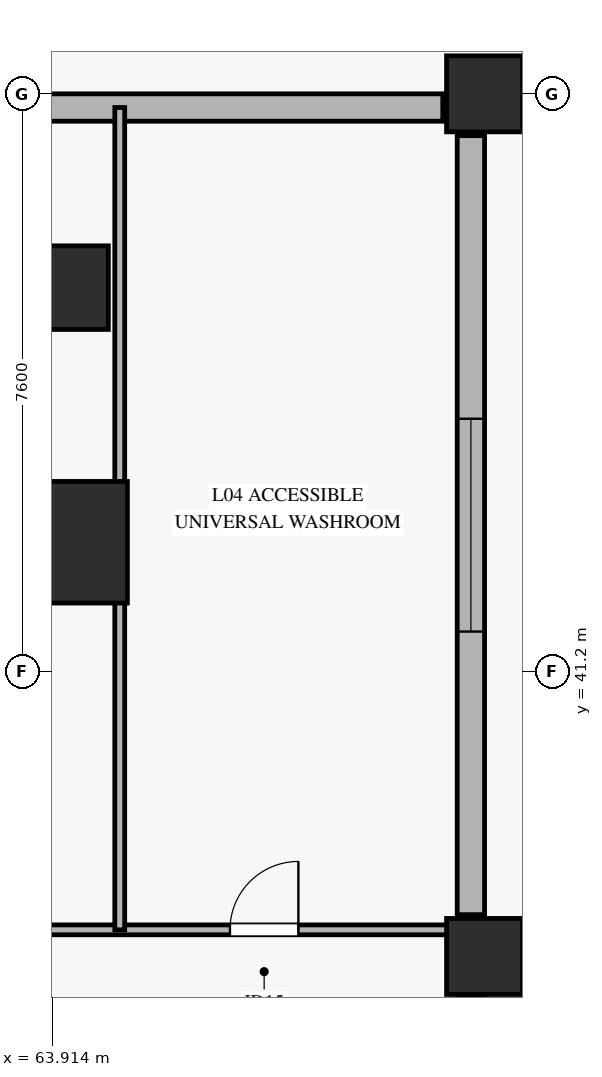
"""IFC4 building model, lengths in metres.
Left out: names, types, materials, properties, quantities, classifications, styles, units other than length and angle.
Written with IfcOpenShell. Run it as: python <this file> out.ifc"""

import sys

from ifc_helpers import new_model, si_unit, direction, frame, frame_2d, origin, origin_2d, place, context, subcontext, project, spatial, rectangle, hollow_rectangle, extrude, source, transform, mapped, element, fill, save


model = new_model("IFC4")
c1 = context("Model", 3, precision=1e-05, world=origin(), true_north=direction((0.0, 1.0)))
c2 = subcontext(c1, "Body", "Model", "MODEL_VIEW")
j1 = project(units=[si_unit("LENGTHUNIT", "METRE"), si_unit("PLANEANGLEUNIT", "RADIAN")], contexts=[c1])
p1 = place(None, origin())
s1 = spatial("IfcSite", under=j1, at=p1, CompositionType="ELEMENT")
p2 = place(p1, origin())
s2 = spatial("IfcBuilding", under=s1, at=p2, CompositionType="ELEMENT")
p3 = place(p2, frame((0.0, 0.0, 15.2)))
s3 = spatial("IfcBuildingStorey", under=s2, at=p3, CompositionType="ELEMENT", Elevation=15.2)
m1 = source(origin(), c2, "Body", "SweptSolid", [
    extrude(hollow_rectangle(XDim=1.6, YDim=1.6, WallThickness=0.075, at=origin_2d()), origin(), (0.0, 0.0, 1.0), 4.65),
])
p4 = place(p3, frame((64.1, 42.9, 0.0), z_axis=(0.0, 0.0, 1.0), x_axis=(1.0, 0.0, 0.0)))
e1 = element("IfcColumn", 1, at=p4, inside=s3, PredefinedType="COLUMN", context=c2, shape_type="MappedRepresentation", body=[
    mapped(m1, transform((0.0, 0.0, 0.0), x_axis=(1.0, 0.0, 0.0), y_axis=(0.0, 1.0, 0.0), z_axis=(0.0, 0.0, 1.0), scale=1.0)),
])
m2 = source(origin(), c2, "Body", "SweptSolid", [
    extrude(hollow_rectangle(XDim=1.1, YDim=1.1, WallThickness=0.05, at=origin_2d()), origin(), (0.0, 0.0, 1.0), 4.65),
])
p5 = place(p3, frame((64.1, 46.25, 0.0), z_axis=(0.0, 0.0, 1.0), x_axis=(1.0, 0.0, 0.0)))
e2 = element("IfcColumn", 2, at=p5, inside=s3, PredefinedType="COLUMN", context=c2, shape_type="MappedRepresentation", body=[
    mapped(m2, transform((0.0, 0.0, 0.0), x_axis=(1.0, 0.0, 0.0), y_axis=(0.0, 1.0, 0.0), z_axis=(0.0, 0.0, 1.0), scale=1.0)),
])
m3 = source(origin(), c2, "Body", "SweptSolid", [
    extrude(hollow_rectangle(XDim=1.0, YDim=1.0, WallThickness=0.045, at=origin_2d()), origin(), (0.0, 0.0, 1.0), 4.65),
])
for number, where, z_axis, x_axis in (
    (3, (69.6, 37.45, 0.0), (0.0, 0.0, 1.0), (1.0, 0.0, 0.0)),
    (4, (69.6, 48.8, 0.0), (0.0, 0.0, 1.0), (1.0, 0.0, 0.0)),
):
    element("IfcColumn", number, at=place(p3, frame(where, z_axis=z_axis, x_axis=x_axis)), inside=s3, PredefinedType="COLUMN", context=c2, shape_type="MappedRepresentation", body=[
        mapped(m3, transform((0.0, 0.0, 0.0), x_axis=(1.0, 0.0, 0.0), y_axis=(0.0, 1.0, 0.0), z_axis=(0.0, 0.0, 1.0), scale=1.0)),
    ])
p6 = place(p3, frame((51.1, 48.62, 0.0), z_axis=(0.0, 0.0, 1.0), x_axis=(1.0, 0.0, 0.0)))
e5 = element("IfcWall", 5, at=p6, inside=s3, PredefinedType="SOLIDWALL", context=c2, shape_type="SweptSolid", body=[
    extrude(rectangle(XDim=17.95, YDim=0.36, at=frame_2d((8.975, 0.0))), origin(), (0.0, 0.0, 1.0), 3.53),
])
p7 = place(p6, frame((1.6, 0.0, 0.72)))
e6 = element("IfcOpeningElement", 6, at=p7, cuts=e5, PredefinedType="OPENING", context=c2, shape_type="SweptSolid", body=[
    extrude(rectangle(XDim=2.8, YDim=2.0, at=frame_2d((1.4, 1.0))), frame((0.0, 0.19, 0.0), z_axis=(0.0, -1.0, 0.0), x_axis=(1.0, 0.0, 0.0)), (0.0, 0.0, 1.0), 0.38),
])
p8 = place(p3, frame((69.42, 38.0, 0.0), z_axis=(0.0, 0.0, 1.0), x_axis=(0.0, 1.0, 0.0)))
e7 = element("IfcWall", 7, at=p8, inside=s3, PredefinedType="SOLIDWALL", context=c2, shape_type="SweptSolid", body=[
    extrude(rectangle(XDim=10.25, YDim=0.36, at=frame_2d((5.125, 0.0))), origin(), (0.0, 0.0, 1.0), 3.53),
])
p9 = place(p8, frame((3.725, 0.0, 0.72)))
e8 = element("IfcOpeningElement", 8, at=p9, cuts=e7, PredefinedType="OPENING", context=c2, shape_type="SweptSolid", body=[
    extrude(rectangle(XDim=2.8, YDim=2.0, at=frame_2d((1.4, 1.0))), frame((0.0, 0.19, 0.0), z_axis=(0.0, -1.0, 0.0), x_axis=(1.0, 0.0, 0.0)), (0.0, 0.0, 1.0), 0.38),
])
p10 = place(p3, frame((56.2, 37.8, 0.0), z_axis=(0.0, 0.0, 1.0), x_axis=(1.0, 0.0, 0.0)))
e9 = element("IfcWall", 9, at=p10, inside=s3, PredefinedType="PARTITIONING", context=c2, shape_type="SweptSolid", body=[
    extrude(rectangle(XDim=13.22, YDim=0.13, at=frame_2d((6.61, 0.0))), origin(), (0.0, 0.0, 1.0), 3.535),
])
p11 = place(p10, frame((1.6, 0.0, 0.0)))
e10 = element("IfcOpeningElement", 10, at=p11, cuts=e9, PredefinedType="OPENING", context=c2, shape_type="SweptSolid", body=[
    extrude(rectangle(XDim=0.9, YDim=2.1, at=frame_2d((0.45, 1.05))), frame((0.0, 0.075, 0.0), z_axis=(0.0, -1.0, 0.0), x_axis=(1.0, 0.0, 0.0)), (0.0, 0.0, 1.0), 0.15),
])
p12 = place(p10, frame((5.75, 0.0, 0.0)))
e11 = element("IfcOpeningElement", 11, at=p12, cuts=e9, PredefinedType="OPENING", context=c2, shape_type="SweptSolid", body=[
    extrude(rectangle(XDim=0.9, YDim=2.1, at=frame_2d((0.45, 1.05))), frame((0.0, 0.075, 0.0), z_axis=(0.0, -1.0, 0.0), x_axis=(1.0, 0.0, 0.0)), (0.0, 0.0, 1.0), 0.15),
])
p13 = place(p10, frame((10.05, 0.0, 0.0)))
e12 = element("IfcOpeningElement", 12, at=p13, cuts=e9, PredefinedType="OPENING", context=c2, shape_type="SweptSolid", body=[
    extrude(rectangle(XDim=0.9, YDim=2.1, at=frame_2d((0.45, 1.05))), frame((0.0, 0.075, 0.0), z_axis=(0.0, -1.0, 0.0), x_axis=(1.0, 0.0, 0.0)), (0.0, 0.0, 1.0), 0.15),
])
p14 = place(p3, frame((64.8, 37.8, 0.0), z_axis=(0.0, 0.0, 1.0), x_axis=(0.0, 1.0, 0.0)))
e13 = element("IfcWall", 13, at=p14, inside=s3, PredefinedType="PARTITIONING", context=c2, shape_type="SweptSolid", body=[
    extrude(rectangle(XDim=10.82, YDim=0.13, at=frame_2d((5.41, 0.0))), origin(), (0.0, 0.0, 1.0), 3.535),
])
m4 = source(origin(), c2, "Body", "SweptSolid", [
    extrude(rectangle(XDim=2.8, YDim=2.0, at=frame_2d((1.4, 1.0))), frame((0.0, 0.03, 0.0), z_axis=(0.0, -1.0, 0.0), x_axis=(1.0, 0.0, 0.0)), (0.0, 0.0, 1.0), 0.06),
])
p15 = place(p9, origin())
e14 = element("IfcWindow", 14, at=p15, inside=s3, PartitioningType="SINGLE_PANEL", PredefinedType="WINDOW", context=c2, shape_type="MappedRepresentation", body=[
    mapped(m4, transform((0.0, 0.0, 0.0), x_axis=(1.0, 0.0, 0.0), y_axis=(0.0, 1.0, 0.0), z_axis=(0.0, 0.0, 1.0), scale=1.0)),
])
fill(e8, e14)
m5 = source(origin(), c2, "Body", "SweptSolid", [
    extrude(rectangle(XDim=0.9, YDim=2.1, at=frame_2d((0.45, 1.05))), frame((0.0, 0.025, 0.0), z_axis=(0.0, -1.0, 0.0), x_axis=(1.0, 0.0, 0.0)), (0.0, 0.0, 1.0), 0.05),
])
p16 = place(p13, origin())
e15 = element("IfcDoor", 15, at=p16, inside=s3, OperationType="SINGLE_SWING_RIGHT", PredefinedType="DOOR", context=c2, shape_type="MappedRepresentation", body=[
    mapped(m5, transform((0.0, 0.0, 0.0), x_axis=(1.0, 0.0, 0.0), y_axis=(0.0, 1.0, 0.0), z_axis=(0.0, 0.0, 1.0), scale=1.0)),
])
fill(e12, e15)
save(model, sys.argv[1])
